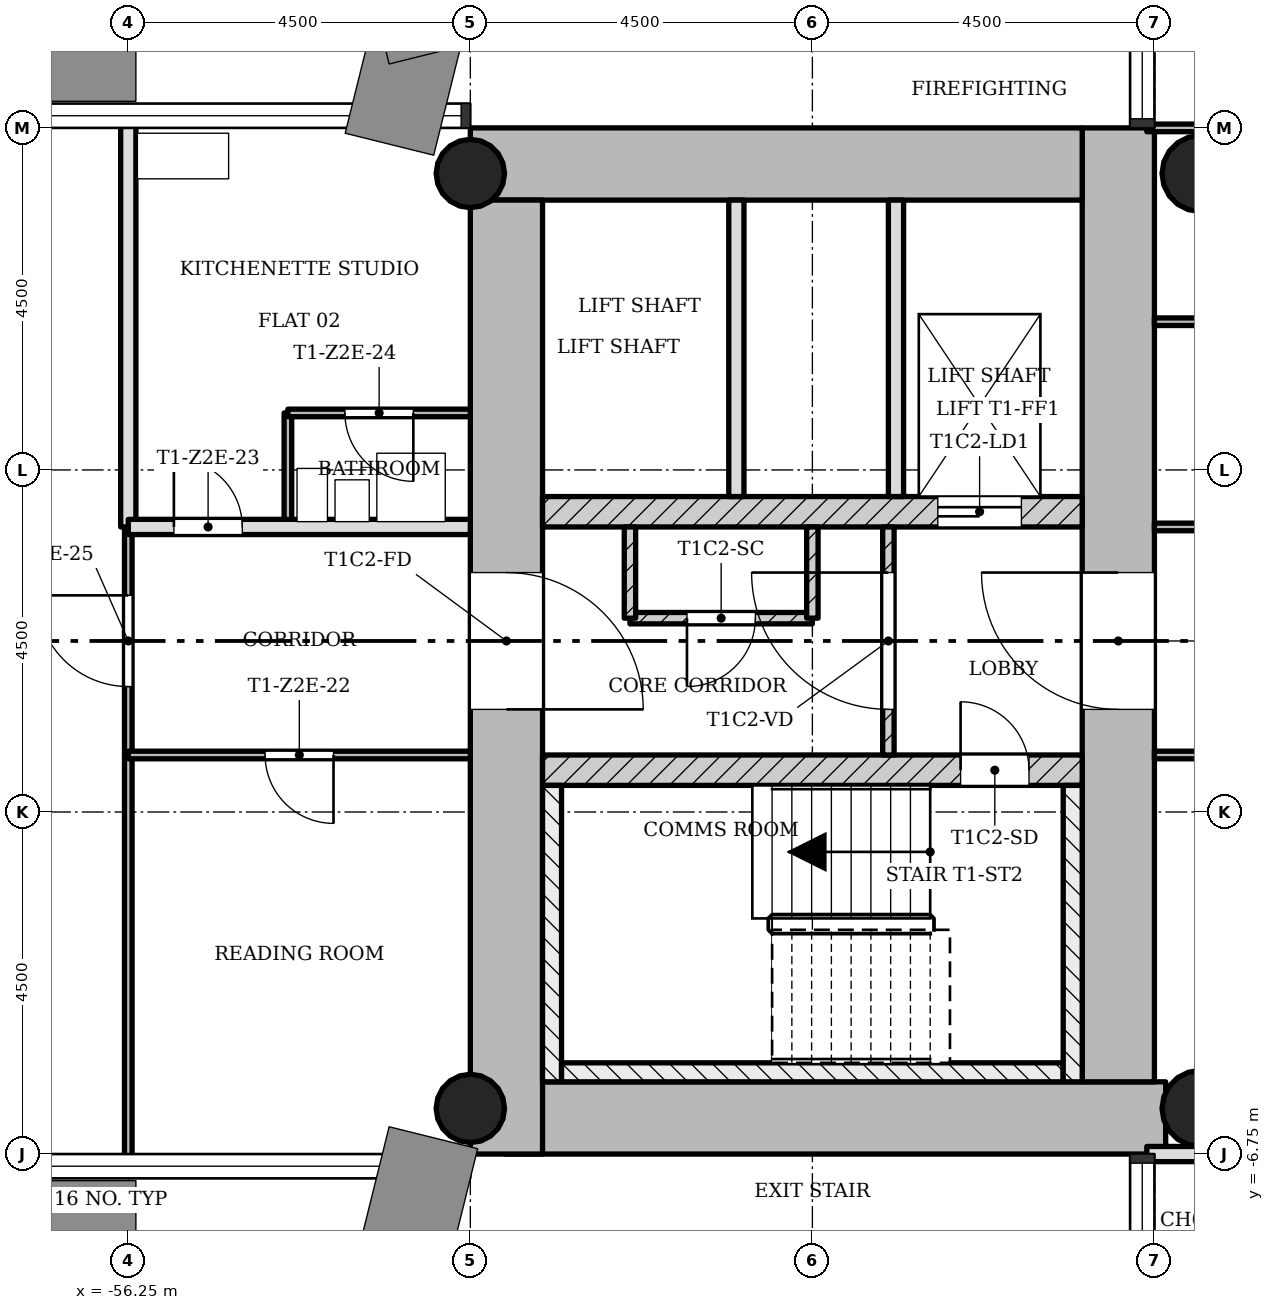
"""IFC4 building model, lengths in metres.
Left out: names, types, materials, properties, quantities, classifications, styles, units other than length and angle.
Written with IfcOpenShell. Run it as: python <this file> out.ifc"""

import sys

from ifc_helpers import new_model, si_unit, direction, frame, frame_2d, origin, origin_2d, place, context, subcontext, project, spatial, rectangle, hollow_circle, extrude, element, fill, save


model = new_model("IFC4")
c1 = context("Model", 3, precision=1e-05, world=origin(), true_north=direction((0.0, 1.0)))
c2 = subcontext(c1, "Body", "Model", "MODEL_VIEW")
j1 = project(units=[si_unit("LENGTHUNIT", "METRE"), si_unit("PLANEANGLEUNIT", "RADIAN")], contexts=[c1])
p1 = place(None, origin())
s1 = spatial("IfcSite", under=j1, at=p1, CompositionType="ELEMENT")
p2 = place(p1, origin())
s2 = spatial("IfcBuilding", under=s1, at=p2, CompositionType="ELEMENT")
p3 = place(p2, frame((0.0, 0.0, 100.4)))
s3 = spatial("IfcBuildingStorey", under=s2, at=p3, CompositionType="ELEMENT", Elevation=100.4)
p4 = place(p3, frame((-51.298, -6.275, 0.0), z_axis=(0.0, 0.0, 1.0), x_axis=(1.0, 0.0, 0.0)))
e1 = element("IfcWall", 1, at=p4, inside=s3, PredefinedType="SHEAR", context=c2, shape_type="SweptSolid", body=[
    extrude(rectangle(XDim=8.696, YDim=0.95, at=frame_2d((4.348, 0.0))), origin(), (0.0, 0.0, 1.0), 3.4),
])
p5 = place(p3, frame((-43.225, -5.8, 0.0), z_axis=(0.0, 0.0, 1.0), x_axis=(0.0, 1.0, 0.0)))
e2 = element("IfcWall", 2, at=p5, inside=s3, PredefinedType="SHEAR", context=c2, shape_type="SweptSolid", body=[
    extrude(rectangle(XDim=12.55, YDim=0.95, at=frame_2d((6.275, 0.0))), origin(), (0.0, 0.0, 1.0), 3.4),
])
p6 = place(p5, frame((4.9, 0.0, 0.0)))
e3 = element("IfcOpeningElement", 3, at=p6, cuts=e2, PredefinedType="OPENING", context=c2, shape_type="SweptSolid", body=[
    extrude(rectangle(XDim=1.8, YDim=2.1, at=frame_2d((0.9, 1.05))), frame((0.0, 0.485, 0.0), z_axis=(0.0, -1.0, 0.0), x_axis=(1.0, 0.0, 0.0)), (0.0, 0.0, 1.0), 0.97),
])
p7 = place(p3, frame((-43.7, 6.275, 0.0), z_axis=(0.0, 0.0, 1.0), x_axis=(-1.0, 0.0, 0.0)))
e4 = element("IfcWall", 4, at=p7, inside=s3, PredefinedType="SHEAR", context=c2, shape_type="SweptSolid", body=[
    extrude(rectangle(XDim=8.05, YDim=0.95, at=frame_2d((4.025, 0.0))), origin(), (0.0, 0.0, 1.0), 3.4),
])
p8 = place(p3, frame((-51.275, 5.8, 0.0), z_axis=(0.0, 0.0, 1.0), x_axis=(0.0, -1.0, 0.0)))
e5 = element("IfcWall", 5, at=p8, inside=s3, PredefinedType="SHEAR", context=c2, shape_type="SweptSolid", body=[
    extrude(rectangle(XDim=12.55, YDim=0.95, at=frame_2d((6.275, 0.0))), origin(), (0.0, 0.0, 1.0), 3.4),
])
p9 = place(p8, frame((4.9, 0.0, 0.0)))
e6 = element("IfcOpeningElement", 6, at=p9, cuts=e5, PredefinedType="OPENING", context=c2, shape_type="SweptSolid", body=[
    extrude(rectangle(XDim=1.8, YDim=2.1, at=frame_2d((0.9, 1.05))), frame((0.0, 0.485, 0.0), z_axis=(0.0, -1.0, 0.0), x_axis=(1.0, 0.0, 0.0)), (0.0, 0.0, 1.0), 0.97),
])
p10 = place(p3, frame((-50.8, -1.7, 0.0), z_axis=(0.0, 0.0, 1.0), x_axis=(1.0, 0.0, 0.0)))
e7 = element("IfcWall", 7, at=p10, inside=s3, PredefinedType="SHEAR", context=c2, shape_type="SweptSolid", body=[
    extrude(rectangle(XDim=7.1, YDim=0.4, at=frame_2d((3.55, 0.0))), origin(), (0.0, 0.0, 1.0), 3.4),
])
p11 = place(p10, frame((5.5, 0.0, 0.0)))
e8 = element("IfcOpeningElement", 8, at=p11, cuts=e7, PredefinedType="OPENING", context=c2, shape_type="SweptSolid", body=[
    extrude(rectangle(XDim=0.9, YDim=2.1, at=frame_2d((0.45, 1.05))), frame((0.0, 0.21, 0.0), z_axis=(0.0, -1.0, 0.0), x_axis=(1.0, 0.0, 0.0)), (0.0, 0.0, 1.0), 0.42),
])
p12 = place(p3, frame((-50.8, 1.7, 0.0), z_axis=(0.0, 0.0, 1.0), x_axis=(1.0, 0.0, 0.0)))
e9 = element("IfcWall", 9, at=p12, inside=s3, PredefinedType="SHEAR", context=c2, shape_type="SweptSolid", body=[
    extrude(rectangle(XDim=7.1, YDim=0.4, at=frame_2d((3.55, 0.0))), origin(), (0.0, 0.0, 1.0), 3.4),
])
p13 = place(p12, frame((5.2, 0.0, 0.0)))
e10 = element("IfcOpeningElement", 10, at=p13, cuts=e9, PredefinedType="OPENING", context=c2, shape_type="SweptSolid", body=[
    extrude(rectangle(XDim=1.1, YDim=2.1, at=frame_2d((0.55, 1.05))), frame((0.0, 0.21, 0.0), z_axis=(0.0, -1.0, 0.0), x_axis=(1.0, 0.0, 0.0)), (0.0, 0.0, 1.0), 0.42),
])
for number, where, z_axis, x_axis in (
    (11, (-51.75, -6.15, 0.0), (0.0, 0.0, 1.0), (1.0, 0.0, 0.0)),
    (12, (-51.75, 6.15, 0.0), (0.0, 0.0, 1.0), (1.0, 0.0, 0.0)),
):
    element("IfcColumn", number, at=place(p3, frame(where, z_axis=z_axis, x_axis=x_axis)), inside=s3, PredefinedType="COLUMN", context=c2, shape_type="SweptSolid", body=[
        extrude(hollow_circle(Radius=0.45, WallThickness=0.032, at=origin_2d()), origin(), (0.0, 0.0, 1.0), 3.4),
    ])
for number, where, z_axis, x_axis in (
    (13, (-42.15, -6.15, 0.0), (0.0, 0.0, 1.0), (1.0, 0.0, 0.0)),
    (14, (-42.15, 6.15, 0.0), (0.0, 0.0, 1.0), (1.0, 0.0, 0.0)),
):
    element("IfcColumn", number, at=place(p3, frame(where, z_axis=z_axis, x_axis=x_axis)), inside=s3, PredefinedType="COLUMN", context=c2, shape_type="SweptSolid", body=[
        extrude(hollow_circle(Radius=0.5, WallThickness=0.036, at=origin_2d()), origin(), (0.0, 0.0, 1.0), 3.4),
    ])
p14 = place(p3, frame((-46.25, 1.5, 0.0), z_axis=(0.0, 0.0, 1.0), x_axis=(0.0, -1.0, 0.0)))
e15 = element("IfcWall", 15, at=p14, inside=s3, PredefinedType="PARTITIONING", context=c2, shape_type="SweptSolid", body=[
    extrude(rectangle(XDim=3.0, YDim=0.15, at=frame_2d((1.5, 0.0))), origin(), (0.0, 0.0, 1.0), 3.0),
])
p15 = place(p14, frame((0.6, 0.0, 0.0)))
e16 = element("IfcOpeningElement", 16, at=p15, cuts=e15, PredefinedType="OPENING", context=c2, shape_type="SweptSolid", body=[
    extrude(rectangle(XDim=1.8, YDim=2.1, at=frame_2d((0.9, 1.05))), frame((0.0, 0.085, 0.0), z_axis=(0.0, -1.0, 0.0), x_axis=(1.0, 0.0, 0.0)), (0.0, 0.0, 1.0), 0.17),
])
for number, where, z_axis, x_axis in (
    (17, (-46.15, 5.8, 0.0), (0.0, 0.0, 1.0), (0.0, -1.0, 0.0)),
    (18, (-48.25, 5.8, 0.0), (0.0, 0.0, 1.0), (0.0, -1.0, 0.0)),
):
    element("IfcWall", number, at=place(p3, frame(where, z_axis=z_axis, x_axis=x_axis)), inside=s3, PredefinedType="SOLIDWALL", context=c2, shape_type="SweptSolid", body=[
        extrude(rectangle(XDim=3.9, YDim=0.2, at=frame_2d((1.95, 0.0))), origin(), (0.0, 0.0, 1.0), 3.0),
    ])
p16 = place(p3, frame((-47.25, 0.3, 0.0), z_axis=(0.0, 0.0, 1.0), x_axis=(-1.0, 0.0, 0.0)))
e19 = element("IfcWall", 19, at=p16, inside=s3, PredefinedType="PARTITIONING", context=c2, shape_type="SweptSolid", body=[
    extrude(rectangle(XDim=2.4, YDim=0.15, at=frame_2d((1.2, 0.0))), origin(), (0.0, 0.0, 1.0), 3.0),
])
p17 = place(p16, frame((0.75, 0.0, 0.0)))
e20 = element("IfcOpeningElement", 20, at=p17, cuts=e19, PredefinedType="OPENING", context=c2, shape_type="SweptSolid", body=[
    extrude(rectangle(XDim=0.9, YDim=2.1, at=frame_2d((0.45, 1.05))), frame((0.0, 0.085, 0.0), z_axis=(0.0, -1.0, 0.0), x_axis=(1.0, 0.0, 0.0)), (0.0, 0.0, 1.0), 0.17),
])
for number, where, z_axis, x_axis in (
    (21, (-47.25, 0.3, 0.0), (0.0, 0.0, 1.0), (0.0, 1.0, 0.0)),
    (22, (-49.65, 0.3, 0.0), (0.0, 0.0, 1.0), (0.0, 1.0, 0.0)),
):
    element("IfcWall", number, at=place(p3, frame(where, z_axis=z_axis, x_axis=x_axis)), inside=s3, PredefinedType="PARTITIONING", context=c2, shape_type="SweptSolid", body=[
        extrude(rectangle(XDim=1.2, YDim=0.15, at=frame_2d((0.6, 0.0))), origin(), (0.0, 0.0, 1.0), 3.0),
    ])
p18 = place(p3, frame((-56.25, -6.85, 0.0), z_axis=(0.0, 0.0, 1.0), x_axis=(0.0, 1.0, 0.0)))
e23 = element("IfcWall", 23, at=p18, inside=s3, PredefinedType="PARTITIONING", context=c2, shape_type="SweptSolid", body=[
    extrude(rectangle(XDim=8.35, YDim=0.1, at=frame_2d((4.175, 0.0))), origin(), (0.0, 0.0, 1.0), 3.0),
])
p19 = place(p18, frame((6.25, 0.0, 0.0)))
e24 = element("IfcOpeningElement", 24, at=p19, cuts=e23, PredefinedType="OPENING", context=c2, shape_type="SweptSolid", body=[
    extrude(rectangle(XDim=1.2, YDim=2.1, at=frame_2d((0.6, 1.05))), frame((0.0, 0.06, 0.0), z_axis=(0.0, -1.0, 0.0), x_axis=(1.0, 0.0, 0.0)), (0.0, 0.0, 1.0), 0.12),
])
p20 = place(p3, frame((-56.25, 1.5, 0.0), z_axis=(0.0, 0.0, 1.0), x_axis=(0.0, 1.0, 0.0)))
e25 = element("IfcWall", 25, at=p20, inside=s3, PredefinedType="SOLIDWALL", context=c2, shape_type="SweptSolid", body=[
    extrude(rectangle(XDim=5.35, YDim=0.2, at=frame_2d((2.675, 0.0))), origin(), (0.0, 0.0, 1.0), 3.0),
])
p21 = place(p3, frame((-54.15, 1.5, 0.0), z_axis=(0.0, 0.0, 1.0), x_axis=(0.0, 1.0, 0.0)))
e26 = element("IfcWall", 26, at=p21, inside=s3, PredefinedType="PARTITIONING", context=c2, shape_type="SweptSolid", body=[
    extrude(rectangle(XDim=1.5, YDim=0.1, at=frame_2d((0.75, 0.0))), origin(), (0.0, 0.0, 1.0), 3.0),
])
p22 = place(p3, frame((-42.85, -6.75, 0.0), z_axis=(0.0, 0.0, 1.0), x_axis=(1.0, 0.0, 0.0)))
e27 = element("IfcWall", 27, at=p22, inside=s3, PredefinedType="SOLIDWALL", context=c2, shape_type="SweptSolid", body=[
    extrude(rectangle(XDim=5.95, YDim=0.2, at=frame_2d((2.975, 0.0))), origin(), (0.0, 0.0, 1.0), 3.0),
])
p23 = place(p3, frame((-56.25, -1.5, 0.0), z_axis=(0.0, 0.0, 1.0), x_axis=(1.0, 0.0, 0.0)))
e28 = element("IfcWall", 28, at=p23, inside=s3, PredefinedType="PARTITIONING", context=c2, shape_type="SweptSolid", body=[
    extrude(rectangle(XDim=4.5, YDim=0.1, at=frame_2d((2.25, 0.0))), origin(), (0.0, 0.0, 1.0), 3.0),
])
p24 = place(p23, frame((1.8, 0.0, 0.0)))
e29 = element("IfcOpeningElement", 29, at=p24, cuts=e28, PredefinedType="OPENING", context=c2, shape_type="SweptSolid", body=[
    extrude(rectangle(XDim=0.9, YDim=2.1, at=frame_2d((0.45, 1.05))), frame((0.0, 0.06, 0.0), z_axis=(0.0, -1.0, 0.0), x_axis=(1.0, 0.0, 0.0)), (0.0, 0.0, 1.0), 0.12),
])
p25 = place(p3, frame((-42.75, -1.5, 0.0), z_axis=(0.0, 0.0, 1.0), x_axis=(1.0, 0.0, 0.0)))
e30 = element("IfcWall", 30, at=p25, inside=s3, PredefinedType="PARTITIONING", context=c2, shape_type="SweptSolid", body=[
    extrude(rectangle(XDim=5.85, YDim=0.1, at=frame_2d((2.925, 0.0))), origin(), (0.0, 0.0, 1.0), 3.0),
])
p26 = place(p25, frame((2.475, 0.0, 0.0)))
e31 = element("IfcOpeningElement", 31, at=p26, cuts=e30, PredefinedType="OPENING", context=c2, shape_type="SweptSolid", body=[
    extrude(rectangle(XDim=0.9, YDim=2.1, at=frame_2d((0.45, 1.05))), frame((0.0, 0.06, 0.0), z_axis=(0.0, -1.0, 0.0), x_axis=(1.0, 0.0, 0.0)), (0.0, 0.0, 1.0), 0.12),
])
p27 = place(p3, frame((-42.75, 1.5, 0.0), z_axis=(0.0, 0.0, 1.0), x_axis=(1.0, 0.0, 0.0)))
e32 = element("IfcWall", 32, at=p27, inside=s3, PredefinedType="PARTITIONING", context=c2, shape_type="SweptSolid", body=[
    extrude(rectangle(XDim=5.85, YDim=0.1, at=frame_2d((2.925, 0.0))), origin(), (0.0, 0.0, 1.0), 3.0),
])
p28 = place(p27, frame((2.475, 0.0, 0.0)))
e33 = element("IfcOpeningElement", 33, at=p28, cuts=e32, PredefinedType="OPENING", context=c2, shape_type="SweptSolid", body=[
    extrude(rectangle(XDim=0.9, YDim=2.1, at=frame_2d((0.45, 1.05))), frame((0.0, 0.06, 0.0), z_axis=(0.0, -1.0, 0.0), x_axis=(1.0, 0.0, 0.0)), (0.0, 0.0, 1.0), 0.12),
])
p29 = place(p3, frame((-56.25, 1.5, 0.0), z_axis=(0.0, 0.0, 1.0), x_axis=(1.0, 0.0, 0.0)))
e34 = element("IfcWall", 34, at=p29, inside=s3, PredefinedType="SOLIDWALL", context=c2, shape_type="SweptSolid", body=[
    extrude(rectangle(XDim=4.5, YDim=0.2, at=frame_2d((2.25, 0.0))), origin(), (0.0, 0.0, 1.0), 3.0),
])
p30 = place(p29, frame((0.6, 0.0, 0.0)))
e35 = element("IfcOpeningElement", 35, at=p30, cuts=e34, PredefinedType="OPENING", context=c2, shape_type="SweptSolid", body=[
    extrude(rectangle(XDim=0.9, YDim=2.1, at=frame_2d((0.45, 1.05))), frame((0.0, 0.11, 0.0), z_axis=(0.0, -1.0, 0.0), x_axis=(1.0, 0.0, 0.0)), (0.0, 0.0, 1.0), 0.22),
])
p31 = place(p3, frame((-54.15, 3.0, 0.0), z_axis=(0.0, 0.0, 1.0), x_axis=(1.0, 0.0, 0.0)))
e36 = element("IfcWall", 36, at=p31, inside=s3, PredefinedType="PARTITIONING", context=c2, shape_type="SweptSolid", body=[
    extrude(rectangle(XDim=2.4, YDim=0.1, at=frame_2d((1.2, 0.0))), origin(), (0.0, 0.0, 1.0), 3.0),
])
p32 = place(p31, frame((0.75, 0.0, 0.0)))
e37 = element("IfcOpeningElement", 37, at=p32, cuts=e36, PredefinedType="OPENING", context=c2, shape_type="SweptSolid", body=[
    extrude(rectangle(XDim=0.9, YDim=2.1, at=frame_2d((0.45, 1.05))), frame((0.0, 0.06, 0.0), z_axis=(0.0, -1.0, 0.0), x_axis=(1.0, 0.0, 0.0)), (0.0, 0.0, 1.0), 0.12),
])
p33 = place(p3, frame((-42.75, 4.2, 0.0), z_axis=(0.0, 0.0, 1.0), x_axis=(1.0, 0.0, 0.0)))
e38 = element("IfcWall", 38, at=p33, inside=s3, PredefinedType="PARTITIONING", context=c2, shape_type="SweptSolid", body=[
    extrude(rectangle(XDim=5.85, YDim=0.1, at=frame_2d((2.925, 0.0))), origin(), (0.0, 0.0, 1.0), 3.0),
])
p34 = place(p3, frame((-42.85, 6.75, 0.0), z_axis=(0.0, 0.0, 1.0), x_axis=(1.0, 0.0, 0.0)))
e39 = element("IfcWall", 39, at=p34, inside=s3, PredefinedType="PARTITIONING", context=c2, shape_type="SweptSolid", body=[
    extrude(rectangle(XDim=5.95, YDim=0.1, at=frame_2d((2.975, 0.0))), origin(), (0.0, 0.0, 1.0), 3.0),
])
p35 = place(p3, frame((-50.675, -1.9, 0.0), z_axis=(0.0, 0.0, 1.0), x_axis=(0.0, -1.0, 0.0)))
e40 = element("IfcWall", 40, at=p35, inside=s3, PredefinedType="SHEAR", context=c2, shape_type="SweptSolid", body=[
    extrude(rectangle(XDim=3.9, YDim=0.25, at=frame_2d((1.95, 0.0))), origin(), (0.0, 0.0, 1.0), 3.4),
])
p36 = place(p3, frame((-43.95, -5.675, 0.0), z_axis=(0.0, 0.0, 1.0), x_axis=(-1.0, 0.0, 0.0)))
e41 = element("IfcWall", 41, at=p36, inside=s3, PredefinedType="SHEAR", context=c2, shape_type="SweptSolid", body=[
    extrude(rectangle(XDim=6.6, YDim=0.25, at=frame_2d((3.3, 0.0))), origin(), (0.0, 0.0, 1.0), 3.4),
])
p37 = place(p3, frame((-43.825, -1.9, 0.0), z_axis=(0.0, 0.0, 1.0), x_axis=(0.0, -1.0, 0.0)))
e42 = element("IfcWall", 42, at=p37, inside=s3, PredefinedType="SHEAR", context=c2, shape_type="SweptSolid", body=[
    extrude(rectangle(XDim=3.9, YDim=0.25, at=frame_2d((1.95, 0.0))), origin(), (0.0, 0.0, 1.0), 3.4),
])
p38 = place(p15, origin())
e43 = element("IfcDoor", 43, at=p38, inside=s3, OperationType="SINGLE_SWING_LEFT", PredefinedType="DOOR", context=c2, shape_type="SweptSolid", body=[
    extrude(rectangle(XDim=1.8, YDim=2.1, at=frame_2d((0.9, 1.05))), frame((0.0, 0.025, 0.0), z_axis=(0.0, -1.0, 0.0), x_axis=(1.0, 0.0, 0.0)), (0.0, 0.0, 1.0), 0.05),
])
fill(e16, e43)
p39 = place(p17, origin())
e44 = element("IfcDoor", 44, at=p39, inside=s3, OperationType="SINGLE_SWING_LEFT", PredefinedType="DOOR", context=c2, shape_type="SweptSolid", body=[
    extrude(rectangle(XDim=0.9, YDim=2.1, at=frame_2d((0.45, 1.05))), frame((0.0, 0.025, 0.0), z_axis=(0.0, -1.0, 0.0), x_axis=(1.0, 0.0, 0.0)), (0.0, 0.0, 1.0), 0.05),
])
fill(e20, e44)
p40 = place(p24, origin())
e45 = element("IfcDoor", 45, at=p40, inside=s3, OperationType="SINGLE_SWING_RIGHT", PredefinedType="DOOR", context=c2, shape_type="SweptSolid", body=[
    extrude(rectangle(XDim=0.9, YDim=2.1, at=frame_2d((0.45, 1.05))), frame((0.0, 0.025, 0.0), z_axis=(0.0, -1.0, 0.0), x_axis=(1.0, 0.0, 0.0)), (0.0, 0.0, 1.0), 0.05),
])
fill(e29, e45)
p41 = place(p30, origin())
e46 = element("IfcDoor", 46, at=p41, inside=s3, OperationType="SINGLE_SWING_RIGHT", PredefinedType="DOOR", context=c2, shape_type="SweptSolid", body=[
    extrude(rectangle(XDim=0.9, YDim=2.1, at=frame_2d((0.45, 1.05))), frame((0.0, 0.025, 0.0), z_axis=(0.0, -1.0, 0.0), x_axis=(1.0, 0.0, 0.0)), (0.0, 0.0, 1.0), 0.05),
])
fill(e35, e46)
p42 = place(p32, origin())
e47 = element("IfcDoor", 47, at=p42, inside=s3, OperationType="SINGLE_SWING_RIGHT", PredefinedType="DOOR", context=c2, shape_type="SweptSolid", body=[
    extrude(rectangle(XDim=0.9, YDim=2.1, at=frame_2d((0.45, 1.05))), frame((0.0, 0.025, 0.0), z_axis=(0.0, -1.0, 0.0), x_axis=(1.0, 0.0, 0.0)), (0.0, 0.0, 1.0), 0.05),
])
fill(e37, e47)
p43 = place(p19, origin())
e48 = element("IfcDoor", 48, at=p43, inside=s3, OperationType="SINGLE_SWING_LEFT", PredefinedType="DOOR", context=c2, shape_type="SweptSolid", body=[
    extrude(rectangle(XDim=1.2, YDim=2.1, at=frame_2d((0.6, 1.05))), frame((0.0, 0.025, 0.0), z_axis=(0.0, -1.0, 0.0), x_axis=(1.0, 0.0, 0.0)), (0.0, 0.0, 1.0), 0.05),
])
fill(e24, e48)
p44 = place(p11, origin())
e49 = element("IfcDoor", 49, at=p44, inside=s3, OperationType="SINGLE_SWING_RIGHT", PredefinedType="DOOR", context=c2, shape_type="SweptSolid", body=[
    extrude(rectangle(XDim=0.9, YDim=2.1, at=frame_2d((0.45, 1.05))), frame((0.0, 0.025, 0.0), z_axis=(0.0, -1.0, 0.0), x_axis=(1.0, 0.0, 0.0)), (0.0, 0.0, 1.0), 0.05),
])
fill(e8, e49)
p45 = place(p13, origin())
e50 = element("IfcDoor", 50, at=p45, inside=s3, OperationType="SLIDING_TO_LEFT", PredefinedType="DOOR", context=c2, shape_type="SweptSolid", body=[
    extrude(rectangle(XDim=1.1, YDim=2.1, at=frame_2d((0.55, 1.05))), frame((0.0, 0.025, 0.0), z_axis=(0.0, -1.0, 0.0), x_axis=(1.0, 0.0, 0.0)), (0.0, 0.0, 1.0), 0.05),
])
fill(e10, e50)
p46 = place(p6, origin())
e51 = element("IfcDoor", 51, at=p46, inside=s3, OperationType="SINGLE_SWING_LEFT", PredefinedType="DOOR", context=c2, shape_type="SweptSolid", body=[
    extrude(rectangle(XDim=1.8, YDim=2.1, at=frame_2d((0.9, 1.05))), frame((0.0, 0.025, 0.0), z_axis=(0.0, -1.0, 0.0), x_axis=(1.0, 0.0, 0.0)), (0.0, 0.0, 1.0), 0.05),
])
fill(e3, e51)
p47 = place(p9, origin())
e52 = element("IfcDoor", 52, at=p47, inside=s3, OperationType="SINGLE_SWING_LEFT", PredefinedType="DOOR", context=c2, shape_type="SweptSolid", body=[
    extrude(rectangle(XDim=1.8, YDim=2.1, at=frame_2d((0.9, 1.05))), frame((0.0, 0.025, 0.0), z_axis=(0.0, -1.0, 0.0), x_axis=(1.0, 0.0, 0.0)), (0.0, 0.0, 1.0), 0.05),
])
fill(e6, e52)
save(model, sys.argv[1])
